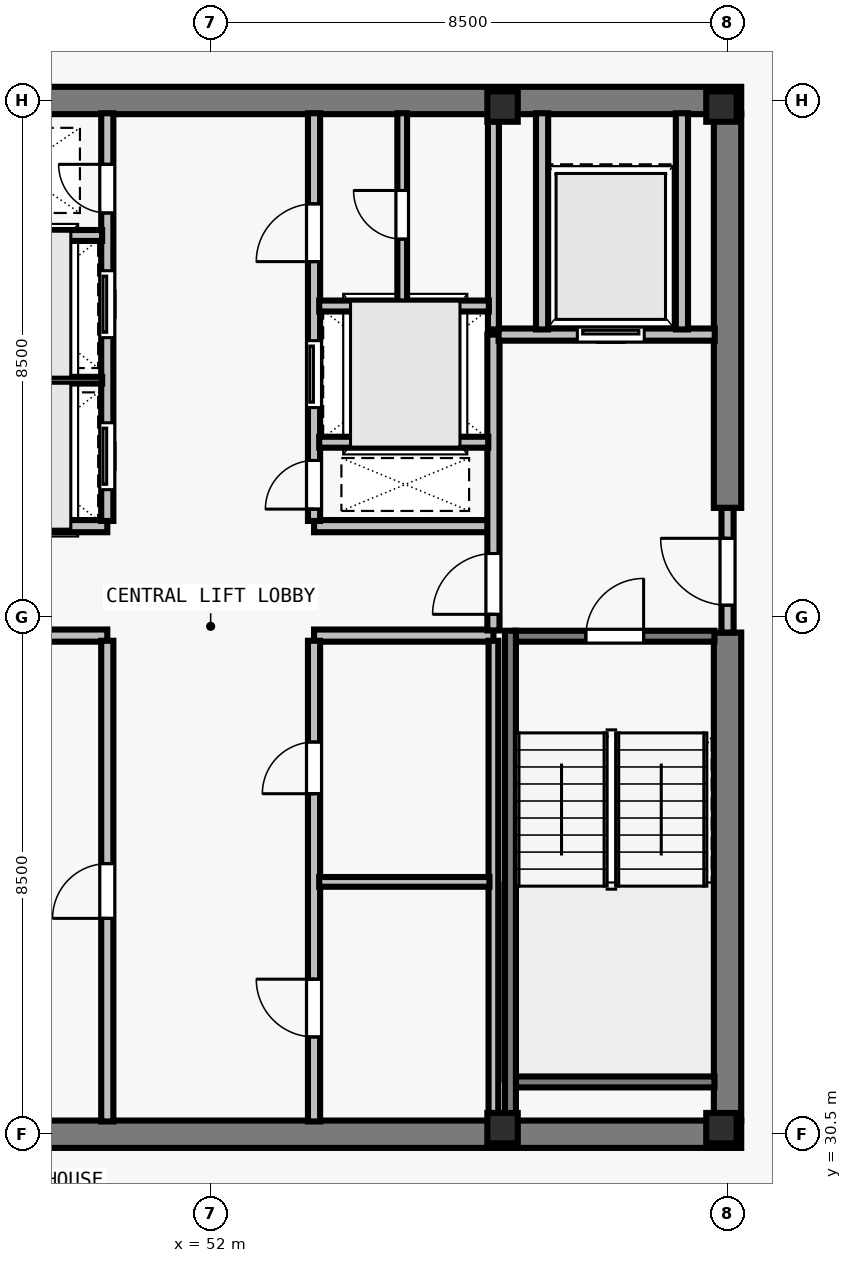
"""IFC4 building model, lengths in metres.
Left out: names, types, materials, properties, quantities, classifications, styles, units other than length and angle.
Written with IfcOpenShell. Run it as: python <this file> out.ifc"""

import sys

from ifc_helpers import new_model, si_unit, direction, frame, frame_2d, origin, origin_2d, place, context, subcontext, project, spatial, rectangle, i_section, extrude, element, fill, save


model = new_model("IFC4")
c1 = context("Model", 3, precision=1e-05, world=origin(), true_north=direction((0.0, 1.0)))
c2 = subcontext(c1, "Body", "Model", "MODEL_VIEW")
j1 = project(units=[si_unit("LENGTHUNIT", "METRE"), si_unit("PLANEANGLEUNIT", "RADIAN")], contexts=[c1])
p1 = place(None, origin())
s1 = spatial("IfcSite", under=j1, at=p1, CompositionType="ELEMENT")
p2 = place(p1, origin())
s2 = spatial("IfcBuilding", under=s1, at=p2, CompositionType="ELEMENT")
p3 = place(p2, frame((0.0, 0.0, 284.0)))
s3 = spatial("IfcBuildingStorey", under=s2, at=p3, CompositionType="ELEMENT", Elevation=284.0)
for number, where, z_axis, x_axis in (
    (1, (56.8, 30.6, 0.0), (0.0, 0.0, 1.0), (1.0, 0.0, 0.0)),
    (2, (60.4, 30.6, 0.0), (0.0, 0.0, 1.0), (1.0, 0.0, 0.0)),
    (3, (56.8, 47.4, 0.0), (0.0, 0.0, 1.0), (1.0, 0.0, 0.0)),
    (4, (60.4, 47.4, 0.0), (0.0, 0.0, 1.0), (1.0, 0.0, 0.0)),
):
    element("IfcColumn", number, at=place(p3, frame(where, z_axis=z_axis, x_axis=x_axis)), inside=s3, PredefinedType="COLUMN", context=c2, shape_type="SweptSolid", body=[
        extrude(i_section(OverallWidth=0.5, OverallDepth=0.5, WebThickness=0.028, FlangeThickness=0.045, at=origin_2d()), origin(), (0.0, 0.0, 1.0), 3.5),
    ])
for number, where, z_axis, x_axis in (
    (5, (43.275, 30.5, 0.0), (0.0, 0.0, 1.0), (1.0, 0.0, 0.0)),
    (6, (43.275, 47.5, 0.0), (0.0, 0.0, 1.0), (1.0, 0.0, 0.0)),
):
    element("IfcWall", number, at=place(p3, frame(where, z_axis=z_axis, x_axis=x_axis)), inside=s3, PredefinedType="SHEAR", context=c2, shape_type="SweptSolid", body=[
        extrude(rectangle(XDim=17.45, YDim=0.45, at=frame_2d((8.725, 0.0))), origin(), (0.0, 0.0, 1.0), 3.29),
    ])
p4 = place(p3, frame((60.5, 30.715, 0.0), z_axis=(0.0, 0.0, 1.0), x_axis=(0.0, 1.0, 0.0)))
e7 = element("IfcWall", 7, at=p4, inside=s3, PredefinedType="SHEAR", context=c2, shape_type="SweptSolid", body=[
    extrude(rectangle(XDim=8.035, YDim=0.45, at=frame_2d((4.018, 0.0))), origin(), (0.0, 0.0, 1.0), 3.29),
])
p5 = place(p3, frame((60.5, 40.8, 0.0), z_axis=(0.0, 0.0, 1.0), x_axis=(0.0, 1.0, 0.0)))
e8 = element("IfcWall", 8, at=p5, inside=s3, PredefinedType="SHEAR", context=c2, shape_type="SweptSolid", body=[
    extrude(rectangle(XDim=6.485, YDim=0.45, at=frame_2d((3.242, 0.0))), origin(), (0.0, 0.0, 1.0), 3.29),
])
for number, where, z_axis, x_axis in (
    (9, (47.35, 38.7, 0.0), (0.0, 0.0, 1.0), (1.0, 0.0, 0.0)),
    (10, (47.35, 40.5, 0.0), (0.0, 0.0, 1.0), (1.0, 0.0, 0.0)),
    (11, (53.7, 38.7, 0.0), (0.0, 0.0, 1.0), (1.0, 0.0, 0.0)),
    (12, (53.7, 40.5, 0.0), (0.0, 0.0, 1.0), (1.0, 0.0, 0.0)),
):
    element("IfcWall", number, at=place(p3, frame(where, z_axis=z_axis, x_axis=x_axis)), inside=s3, PredefinedType="SOLIDWALL", context=c2, shape_type="SweptSolid", body=[
        extrude(rectangle(XDim=2.95, YDim=0.2, at=frame_2d((1.475, 0.0))), origin(), (0.0, 0.0, 1.0), 3.29),
    ])
p6 = place(p3, frame((50.3, 30.71, 0.0), z_axis=(0.0, 0.0, 1.0), x_axis=(0.0, 1.0, 0.0)))
e13 = element("IfcWall", 13, at=p6, inside=s3, PredefinedType="SOLIDWALL", context=c2, shape_type="SweptSolid", body=[
    extrude(rectangle(XDim=7.905, YDim=0.2, at=frame_2d((3.953, 0.0))), origin(), (0.0, 0.0, 1.0), 3.29),
])
p7 = place(p6, frame((3.34, 0.0, 0.0)))
e14 = element("IfcOpeningElement", 14, at=p7, cuts=e13, PredefinedType="OPENING", context=c2, shape_type="SweptSolid", body=[
    extrude(rectangle(XDim=0.9, YDim=2.12, at=frame_2d((0.45, 1.06))), frame((0.0, 0.11, 0.0), z_axis=(0.0, -1.0, 0.0), x_axis=(1.0, 0.0, 0.0)), (0.0, 0.0, 1.0), 0.22),
])
p8 = place(p3, frame((53.7, 30.71, 0.0), z_axis=(0.0, 0.0, 1.0), x_axis=(0.0, 1.0, 0.0)))
e15 = element("IfcWall", 15, at=p8, inside=s3, PredefinedType="SOLIDWALL", context=c2, shape_type="SweptSolid", body=[
    extrude(rectangle(XDim=7.905, YDim=0.2, at=frame_2d((3.953, 0.0))), origin(), (0.0, 0.0, 1.0), 3.29),
])
p9 = place(p8, frame((1.39, 0.0, 0.0)))
e16 = element("IfcOpeningElement", 16, at=p9, cuts=e15, PredefinedType="OPENING", context=c2, shape_type="SweptSolid", body=[
    extrude(rectangle(XDim=0.95, YDim=2.12, at=frame_2d((0.475, 1.06))), frame((0.0, 0.11, 0.0), z_axis=(0.0, -1.0, 0.0), x_axis=(1.0, 0.0, 0.0)), (0.0, 0.0, 1.0), 0.22),
])
p10 = place(p8, frame((5.39, 0.0, 0.0)))
e17 = element("IfcOpeningElement", 17, at=p10, cuts=e15, PredefinedType="OPENING", context=c2, shape_type="SweptSolid", body=[
    extrude(rectangle(XDim=0.85, YDim=2.12, at=frame_2d((0.425, 1.06))), frame((0.0, 0.11, 0.0), z_axis=(0.0, -1.0, 0.0), x_axis=(1.0, 0.0, 0.0)), (0.0, 0.0, 1.0), 0.22),
])
p11 = place(p3, frame((50.3, 40.585, 0.0), z_axis=(0.0, 0.0, 1.0), x_axis=(0.0, 1.0, 0.0)))
e18 = element("IfcWall", 18, at=p11, inside=s3, PredefinedType="SOLIDWALL", context=c2, shape_type="SweptSolid", body=[
    extrude(rectangle(XDim=6.705, YDim=0.2, at=frame_2d((3.353, 0.0))), origin(), (0.0, 0.0, 1.0), 3.29),
])
p12 = place(p11, frame((0.515, 0.0, 0.0)))
e19 = element("IfcOpeningElement", 19, at=p12, cuts=e18, PredefinedType="OPENING", context=c2, shape_type="SweptSolid", body=[
    extrude(rectangle(XDim=1.1, YDim=2.2, at=frame_2d((0.55, 1.1))), frame((0.0, 0.11, 0.0), z_axis=(0.0, -1.0, 0.0), x_axis=(1.0, 0.0, 0.0)), (0.0, 0.0, 1.0), 0.22),
])
p13 = place(p11, frame((3.015, 0.0, 0.0)))
e20 = element("IfcOpeningElement", 20, at=p13, cuts=e18, PredefinedType="OPENING", context=c2, shape_type="SweptSolid", body=[
    extrude(rectangle(XDim=1.1, YDim=2.2, at=frame_2d((0.55, 1.1))), frame((0.0, 0.11, 0.0), z_axis=(0.0, -1.0, 0.0), x_axis=(1.0, 0.0, 0.0)), (0.0, 0.0, 1.0), 0.22),
])
p14 = place(p11, frame((5.065, 0.0, 0.0)))
e21 = element("IfcOpeningElement", 21, at=p14, cuts=e18, PredefinedType="OPENING", context=c2, shape_type="SweptSolid", body=[
    extrude(rectangle(XDim=0.8, YDim=2.08, at=frame_2d((0.4, 1.04))), frame((0.0, 0.11, 0.0), z_axis=(0.0, -1.0, 0.0), x_axis=(1.0, 0.0, 0.0)), (0.0, 0.0, 1.0), 0.22),
])
p15 = place(p3, frame((53.7, 40.585, 0.0), z_axis=(0.0, 0.0, 1.0), x_axis=(0.0, 1.0, 0.0)))
e22 = element("IfcWall", 22, at=p15, inside=s3, PredefinedType="SOLIDWALL", context=c2, shape_type="SweptSolid", body=[
    extrude(rectangle(XDim=6.705, YDim=0.2, at=frame_2d((3.353, 0.0))), origin(), (0.0, 0.0, 1.0), 3.29),
])
p16 = place(p15, frame((0.195, 0.0, 0.0)))
e23 = element("IfcOpeningElement", 23, at=p16, cuts=e22, PredefinedType="OPENING", context=c2, shape_type="SweptSolid", body=[
    extrude(rectangle(XDim=0.8, YDim=2.08, at=frame_2d((0.4, 1.04))), frame((0.0, 0.11, 0.0), z_axis=(0.0, -1.0, 0.0), x_axis=(1.0, 0.0, 0.0)), (0.0, 0.0, 1.0), 0.22),
])
p17 = place(p15, frame((1.865, 0.0, 0.0)))
e24 = element("IfcOpeningElement", 24, at=p17, cuts=e22, PredefinedType="OPENING", context=c2, shape_type="SweptSolid", body=[
    extrude(rectangle(XDim=1.1, YDim=2.2, at=frame_2d((0.55, 1.1))), frame((0.0, 0.11, 0.0), z_axis=(0.0, -1.0, 0.0), x_axis=(1.0, 0.0, 0.0)), (0.0, 0.0, 1.0), 0.22),
])
p18 = place(p15, frame((4.265, 0.0, 0.0)))
e25 = element("IfcOpeningElement", 25, at=p18, cuts=e22, PredefinedType="OPENING", context=c2, shape_type="SweptSolid", body=[
    extrude(rectangle(XDim=0.95, YDim=2.12, at=frame_2d((0.475, 1.06))), frame((0.0, 0.11, 0.0), z_axis=(0.0, -1.0, 0.0), x_axis=(1.0, 0.0, 0.0)), (0.0, 0.0, 1.0), 0.22),
])
p19 = place(p3, frame((60.5, 38.75, 0.0), z_axis=(0.0, 0.0, 1.0), x_axis=(0.0, 1.0, 0.0)))
e26 = element("IfcWall", 26, at=p19, inside=s3, PredefinedType="SOLIDWALL", context=c2, shape_type="SweptSolid", body=[
    extrude(rectangle(XDim=2.05, YDim=0.2, at=frame_2d((1.025, 0.0))), origin(), (0.0, 0.0, 1.0), 3.29),
])
p20 = place(p19, frame((0.45, 0.0, 0.0)))
e27 = element("IfcOpeningElement", 27, at=p20, cuts=e26, PredefinedType="OPENING", context=c2, shape_type="SweptSolid", body=[
    extrude(rectangle(XDim=1.1, YDim=2.15, at=frame_2d((0.55, 1.075))), frame((0.0, 0.11, 0.0), z_axis=(0.0, -1.0, 0.0), x_axis=(1.0, 0.0, 0.0)), (0.0, 0.0, 1.0), 0.22),
])
p21 = place(p3, frame((56.65, 38.785, 0.0), z_axis=(0.0, 0.0, 1.0), x_axis=(0.0, 1.0, 0.0)))
e28 = element("IfcWall", 28, at=p21, inside=s3, PredefinedType="SOLIDWALL", context=c2, shape_type="SweptSolid", body=[
    extrude(rectangle(XDim=4.865, YDim=0.2, at=frame_2d((2.433, 0.0))), origin(), (0.0, 0.0, 1.0), 3.29),
])
p22 = place(p21, frame((0.265, 0.0, 0.0)))
e29 = element("IfcOpeningElement", 29, at=p22, cuts=e28, PredefinedType="OPENING", context=c2, shape_type="SweptSolid", body=[
    extrude(rectangle(XDim=1.0, YDim=2.15, at=frame_2d((0.5, 1.075))), frame((0.0, 0.11, 0.0), z_axis=(0.0, -1.0, 0.0), x_axis=(1.0, 0.0, 0.0)), (0.0, 0.0, 1.0), 0.22),
])
p23 = place(p3, frame((56.735, 43.65, 0.0), z_axis=(0.0, 0.0, 1.0), x_axis=(1.0, 0.0, 0.0)))
e30 = element("IfcWall", 30, at=p23, inside=s3, PredefinedType="SOLIDWALL", context=c2, shape_type="SweptSolid", body=[
    extrude(rectangle(XDim=3.555, YDim=0.2, at=frame_2d((1.777, 0.0))), origin(), (0.0, 0.0, 1.0), 3.29),
])
p24 = place(p23, frame((1.295, 0.0, 0.0)))
e31 = element("IfcOpeningElement", 31, at=p24, cuts=e30, PredefinedType="OPENING", context=c2, shape_type="SweptSolid", body=[
    extrude(rectangle(XDim=1.1, YDim=2.2, at=frame_2d((0.55, 1.1))), frame((0.0, 0.11, 0.0), z_axis=(0.0, -1.0, 0.0), x_axis=(1.0, 0.0, 0.0)), (0.0, 0.0, 1.0), 0.22),
])
for number, where, z_axis, x_axis in (
    (32, (57.45, 43.735, 0.0), (0.0, 0.0, 1.0), (0.0, 1.0, 0.0)),
    (33, (59.75, 43.735, 0.0), (0.0, 0.0, 1.0), (0.0, 1.0, 0.0)),
):
    element("IfcWall", number, at=place(p3, frame(where, z_axis=z_axis, x_axis=x_axis)), inside=s3, PredefinedType="SOLIDWALL", context=c2, shape_type="SweptSolid", body=[
        extrude(rectangle(XDim=3.555, YDim=0.2, at=frame_2d((1.777, 0.0))), origin(), (0.0, 0.0, 1.0), 3.29),
    ])
p25 = place(p3, frame((56.65, 30.71, 0.0), z_axis=(0.0, 0.0, 1.0), x_axis=(0.0, 1.0, 0.0)))
e34 = element("IfcWall", 34, at=p25, inside=s3, PredefinedType="PARTITIONING", context=c2, shape_type="SweptSolid", body=[
    extrude(rectangle(XDim=7.905, YDim=0.16, at=frame_2d((3.953, 0.0))), origin(), (0.0, 0.0, 1.0), 3.29),
])
p26 = place(p3, frame((53.785, 34.65, 0.0), z_axis=(0.0, 0.0, 1.0), x_axis=(1.0, 0.0, 0.0)))
e35 = element("IfcWall", 35, at=p26, inside=s3, PredefinedType="PARTITIONING", context=c2, shape_type="SweptSolid", body=[
    extrude(rectangle(XDim=2.8, YDim=0.16, at=frame_2d((1.4, 0.0))), origin(), (0.0, 0.0, 1.0), 3.29),
])
p27 = place(p3, frame((47.435, 42.9, 0.0), z_axis=(0.0, 0.0, 1.0), x_axis=(1.0, 0.0, 0.0)))
e36 = element("IfcWall", 36, at=p27, inside=s3, PredefinedType="PARTITIONING", context=c2, shape_type="SweptSolid", body=[
    extrude(rectangle(XDim=2.78, YDim=0.11, at=frame_2d((1.39, 0.0))), origin(), (0.0, 0.0, 1.0), 3.29),
])
p28 = place(p3, frame((47.425, 45.28, 0.0), z_axis=(0.0, 0.0, 1.0), x_axis=(1.0, 0.0, 0.0)))
e37 = element("IfcWall", 37, at=p28, inside=s3, PredefinedType="SOLIDWALL", context=c2, shape_type="SweptSolid", body=[
    extrude(rectangle(XDim=2.79, YDim=0.18, at=frame_2d((1.395, 0.0))), origin(), (0.0, 0.0, 1.0), 3.29),
])
p29 = place(p3, frame((56.65, 43.735, 0.0), z_axis=(0.0, 0.0, 1.0), x_axis=(0.0, 1.0, 0.0)))
e38 = element("IfcWall", 38, at=p29, inside=s3, PredefinedType="SOLIDWALL", context=c2, shape_type="SweptSolid", body=[
    extrude(rectangle(XDim=3.555, YDim=0.18, at=frame_2d((1.777, 0.0))), origin(), (0.0, 0.0, 1.0), 3.29),
])
p30 = place(p3, frame((53.785, 41.88, 0.0), z_axis=(0.0, 0.0, 1.0), x_axis=(1.0, 0.0, 0.0)))
e39 = element("IfcWall", 39, at=p30, inside=s3, PredefinedType="SOLIDWALL", context=c2, shape_type="SweptSolid", body=[
    extrude(rectangle(XDim=2.78, YDim=0.18, at=frame_2d((1.39, 0.0))), origin(), (0.0, 0.0, 1.0), 3.29),
])
p31 = place(p3, frame((53.785, 44.12, 0.0), z_axis=(0.0, 0.0, 1.0), x_axis=(1.0, 0.0, 0.0)))
e40 = element("IfcWall", 40, at=p31, inside=s3, PredefinedType="SOLIDWALL", context=c2, shape_type="SweptSolid", body=[
    extrude(rectangle(XDim=2.79, YDim=0.18, at=frame_2d((1.395, 0.0))), origin(), (0.0, 0.0, 1.0), 3.29),
])
p32 = place(p3, frame((55.15, 44.195, 0.0), z_axis=(0.0, 0.0, 1.0), x_axis=(0.0, 1.0, 0.0)))
e41 = element("IfcWall", 41, at=p32, inside=s3, PredefinedType="PARTITIONING", context=c2, shape_type="SweptSolid", body=[
    extrude(rectangle(XDim=3.095, YDim=0.16, at=frame_2d((1.547, 0.0))), origin(), (0.0, 0.0, 1.0), 3.29),
])
p33 = place(p32, frame((1.025, 0.0, 0.0)))
e42 = element("IfcOpeningElement", 42, at=p33, cuts=e41, PredefinedType="OPENING", context=c2, shape_type="SweptSolid", body=[
    extrude(rectangle(XDim=0.8, YDim=2.1, at=frame_2d((0.4, 1.05))), frame((0.0, 0.09, 0.0), z_axis=(0.0, -1.0, 0.0), x_axis=(1.0, 0.0, 0.0)), (0.0, 0.0, 1.0), 0.18),
])
p34 = place(p3, frame((57.005, 38.69, 0.0), z_axis=(0.0, 0.0, 1.0), x_axis=(1.0, 0.0, 0.0)))
e43 = element("IfcWall", 43, at=p34, inside=s3, PredefinedType="SOLIDWALL", context=c2, shape_type="SweptSolid", body=[
    extrude(rectangle(XDim=3.28, YDim=0.18, at=frame_2d((1.64, 0.0))), origin(), (0.0, 0.0, 1.0), 3.29),
])
p35 = place(p34, frame((1.165, 0.0, 0.0)))
e44 = element("IfcOpeningElement", 44, at=p35, cuts=e43, PredefinedType="OPENING", context=c2, shape_type="SweptSolid", body=[
    extrude(rectangle(XDim=0.95, YDim=2.15, at=frame_2d((0.475, 1.075))), frame((0.0, 0.1, 0.0), z_axis=(0.0, -1.0, 0.0), x_axis=(1.0, 0.0, 0.0)), (0.0, 0.0, 1.0), 0.2),
])
p36 = place(p3, frame((57.005, 31.36, 0.0), z_axis=(0.0, 0.0, 1.0), x_axis=(1.0, 0.0, 0.0)))
e45 = element("IfcWall", 45, at=p36, inside=s3, PredefinedType="SOLIDWALL", context=c2, shape_type="SweptSolid", body=[
    extrude(rectangle(XDim=3.28, YDim=0.18, at=frame_2d((1.64, 0.0))), origin(), (0.0, 0.0, 1.0), 3.29),
])
p37 = place(p3, frame((56.93, 38.78, 0.0), z_axis=(0.0, 0.0, 1.0), x_axis=(0.0, -1.0, 0.0)))
e46 = element("IfcWall", 46, at=p37, inside=s3, PredefinedType="SOLIDWALL", context=c2, shape_type="SweptSolid", body=[
    extrude(rectangle(XDim=8.067, YDim=0.18, at=frame_2d((4.034, 0.0))), origin(), (0.0, 0.0, 1.0), 3.29),
])
p38 = place(p20, origin())
e47 = element("IfcDoor", 47, at=p38, inside=s3, OperationType="SINGLE_SWING_RIGHT", PredefinedType="DOOR", context=c2, shape_type="SweptSolid", body=[
    extrude(rectangle(XDim=1.1, YDim=2.15, at=frame_2d((0.55, 1.075))), frame((0.0, 0.025, 0.0), z_axis=(0.0, -1.0, 0.0), x_axis=(1.0, 0.0, 0.0)), (0.0, 0.0, 1.0), 0.05),
])
fill(e27, e47)
p39 = place(p22, origin())
e48 = element("IfcDoor", 48, at=p39, inside=s3, OperationType="SINGLE_SWING_LEFT", PredefinedType="DOOR", context=c2, shape_type="SweptSolid", body=[
    extrude(rectangle(XDim=1.0, YDim=2.15, at=frame_2d((0.5, 1.075))), frame((0.0, 0.025, 0.0), z_axis=(0.0, -1.0, 0.0), x_axis=(1.0, 0.0, 0.0)), (0.0, 0.0, 1.0), 0.05),
])
fill(e29, e48)
p40 = place(p24, origin())
e49 = element("IfcDoor", 49, at=p40, inside=s3, OperationType="SLIDING_TO_LEFT", PredefinedType="DOOR", context=c2, shape_type="SweptSolid", body=[
    extrude(rectangle(XDim=1.1, YDim=2.2, at=frame_2d((0.55, 1.1))), frame((0.0, 0.025, 0.0), z_axis=(0.0, -1.0, 0.0), x_axis=(1.0, 0.0, 0.0)), (0.0, 0.0, 1.0), 0.05),
])
fill(e31, e49)
p41 = place(p7, origin())
e50 = element("IfcDoor", 50, at=p41, inside=s3, OperationType="SINGLE_SWING_LEFT", PredefinedType="DOOR", context=c2, shape_type="SweptSolid", body=[
    extrude(rectangle(XDim=0.9, YDim=2.12, at=frame_2d((0.45, 1.06))), frame((0.0, 0.025, 0.0), z_axis=(0.0, -1.0, 0.0), x_axis=(1.0, 0.0, 0.0)), (0.0, 0.0, 1.0), 0.05),
])
fill(e14, e50)
p42 = place(p9, origin())
e51 = element("IfcDoor", 51, at=p42, inside=s3, OperationType="SINGLE_SWING_RIGHT", PredefinedType="DOOR", context=c2, shape_type="SweptSolid", body=[
    extrude(rectangle(XDim=0.95, YDim=2.12, at=frame_2d((0.475, 1.06))), frame((0.0, 0.025, 0.0), z_axis=(0.0, -1.0, 0.0), x_axis=(1.0, 0.0, 0.0)), (0.0, 0.0, 1.0), 0.05),
])
fill(e16, e51)
p43 = place(p10, origin())
e52 = element("IfcDoor", 52, at=p43, inside=s3, OperationType="SINGLE_SWING_LEFT", PredefinedType="DOOR", context=c2, shape_type="SweptSolid", body=[
    extrude(rectangle(XDim=0.85, YDim=2.12, at=frame_2d((0.425, 1.06))), frame((0.0, 0.025, 0.0), z_axis=(0.0, -1.0, 0.0), x_axis=(1.0, 0.0, 0.0)), (0.0, 0.0, 1.0), 0.05),
])
fill(e17, e52)
p44 = place(p12, origin())
e53 = element("IfcDoor", 53, at=p44, inside=s3, OperationType="SLIDING_TO_LEFT", PredefinedType="DOOR", context=c2, shape_type="SweptSolid", body=[
    extrude(rectangle(XDim=1.1, YDim=2.2, at=frame_2d((0.55, 1.1))), frame((0.0, 0.025, 0.0), z_axis=(0.0, -1.0, 0.0), x_axis=(1.0, 0.0, 0.0)), (0.0, 0.0, 1.0), 0.05),
])
fill(e19, e53)
p45 = place(p13, origin())
e54 = element("IfcDoor", 54, at=p45, inside=s3, OperationType="SLIDING_TO_LEFT", PredefinedType="DOOR", context=c2, shape_type="SweptSolid", body=[
    extrude(rectangle(XDim=1.1, YDim=2.2, at=frame_2d((0.55, 1.1))), frame((0.0, 0.025, 0.0), z_axis=(0.0, -1.0, 0.0), x_axis=(1.0, 0.0, 0.0)), (0.0, 0.0, 1.0), 0.05),
])
fill(e20, e54)
p46 = place(p14, origin())
e55 = element("IfcDoor", 55, at=p46, inside=s3, OperationType="SINGLE_SWING_RIGHT", PredefinedType="DOOR", context=c2, shape_type="SweptSolid", body=[
    extrude(rectangle(XDim=0.8, YDim=2.08, at=frame_2d((0.4, 1.04))), frame((0.0, 0.025, 0.0), z_axis=(0.0, -1.0, 0.0), x_axis=(1.0, 0.0, 0.0)), (0.0, 0.0, 1.0), 0.05),
])
fill(e21, e55)
p47 = place(p16, origin())
e56 = element("IfcDoor", 56, at=p47, inside=s3, OperationType="SINGLE_SWING_LEFT", PredefinedType="DOOR", context=c2, shape_type="SweptSolid", body=[
    extrude(rectangle(XDim=0.8, YDim=2.08, at=frame_2d((0.4, 1.04))), frame((0.0, 0.025, 0.0), z_axis=(0.0, -1.0, 0.0), x_axis=(1.0, 0.0, 0.0)), (0.0, 0.0, 1.0), 0.05),
])
fill(e23, e56)
p48 = place(p17, origin())
e57 = element("IfcDoor", 57, at=p48, inside=s3, OperationType="SLIDING_TO_LEFT", PredefinedType="DOOR", context=c2, shape_type="SweptSolid", body=[
    extrude(rectangle(XDim=1.1, YDim=2.2, at=frame_2d((0.55, 1.1))), frame((0.0, 0.025, 0.0), z_axis=(0.0, -1.0, 0.0), x_axis=(1.0, 0.0, 0.0)), (0.0, 0.0, 1.0), 0.05),
])
fill(e24, e57)
p49 = place(p18, origin())
e58 = element("IfcDoor", 58, at=p49, inside=s3, OperationType="SINGLE_SWING_LEFT", PredefinedType="DOOR", context=c2, shape_type="SweptSolid", body=[
    extrude(rectangle(XDim=0.95, YDim=2.12, at=frame_2d((0.475, 1.06))), frame((0.0, 0.025, 0.0), z_axis=(0.0, -1.0, 0.0), x_axis=(1.0, 0.0, 0.0)), (0.0, 0.0, 1.0), 0.05),
])
fill(e25, e58)
p50 = place(p33, origin())
e59 = element("IfcDoor", 59, at=p50, inside=s3, OperationType="SINGLE_SWING_RIGHT", PredefinedType="DOOR", context=c2, shape_type="SweptSolid", body=[
    extrude(rectangle(XDim=0.8, YDim=2.1, at=frame_2d((0.4, 1.05))), frame((0.0, 0.025, 0.0), z_axis=(0.0, -1.0, 0.0), x_axis=(1.0, 0.0, 0.0)), (0.0, 0.0, 1.0), 0.05),
])
fill(e42, e59)
p51 = place(p35, origin())
e60 = element("IfcDoor", 60, at=p51, inside=s3, OperationType="SINGLE_SWING_RIGHT", PredefinedType="DOOR", context=c2, shape_type="SweptSolid", body=[
    extrude(rectangle(XDim=0.95, YDim=2.15, at=frame_2d((0.475, 1.075))), frame((0.0, 0.025, 0.0), z_axis=(0.0, -1.0, 0.0), x_axis=(1.0, 0.0, 0.0)), (0.0, 0.0, 1.0), 0.05),
])
fill(e44, e60)
save(model, sys.argv[1])
